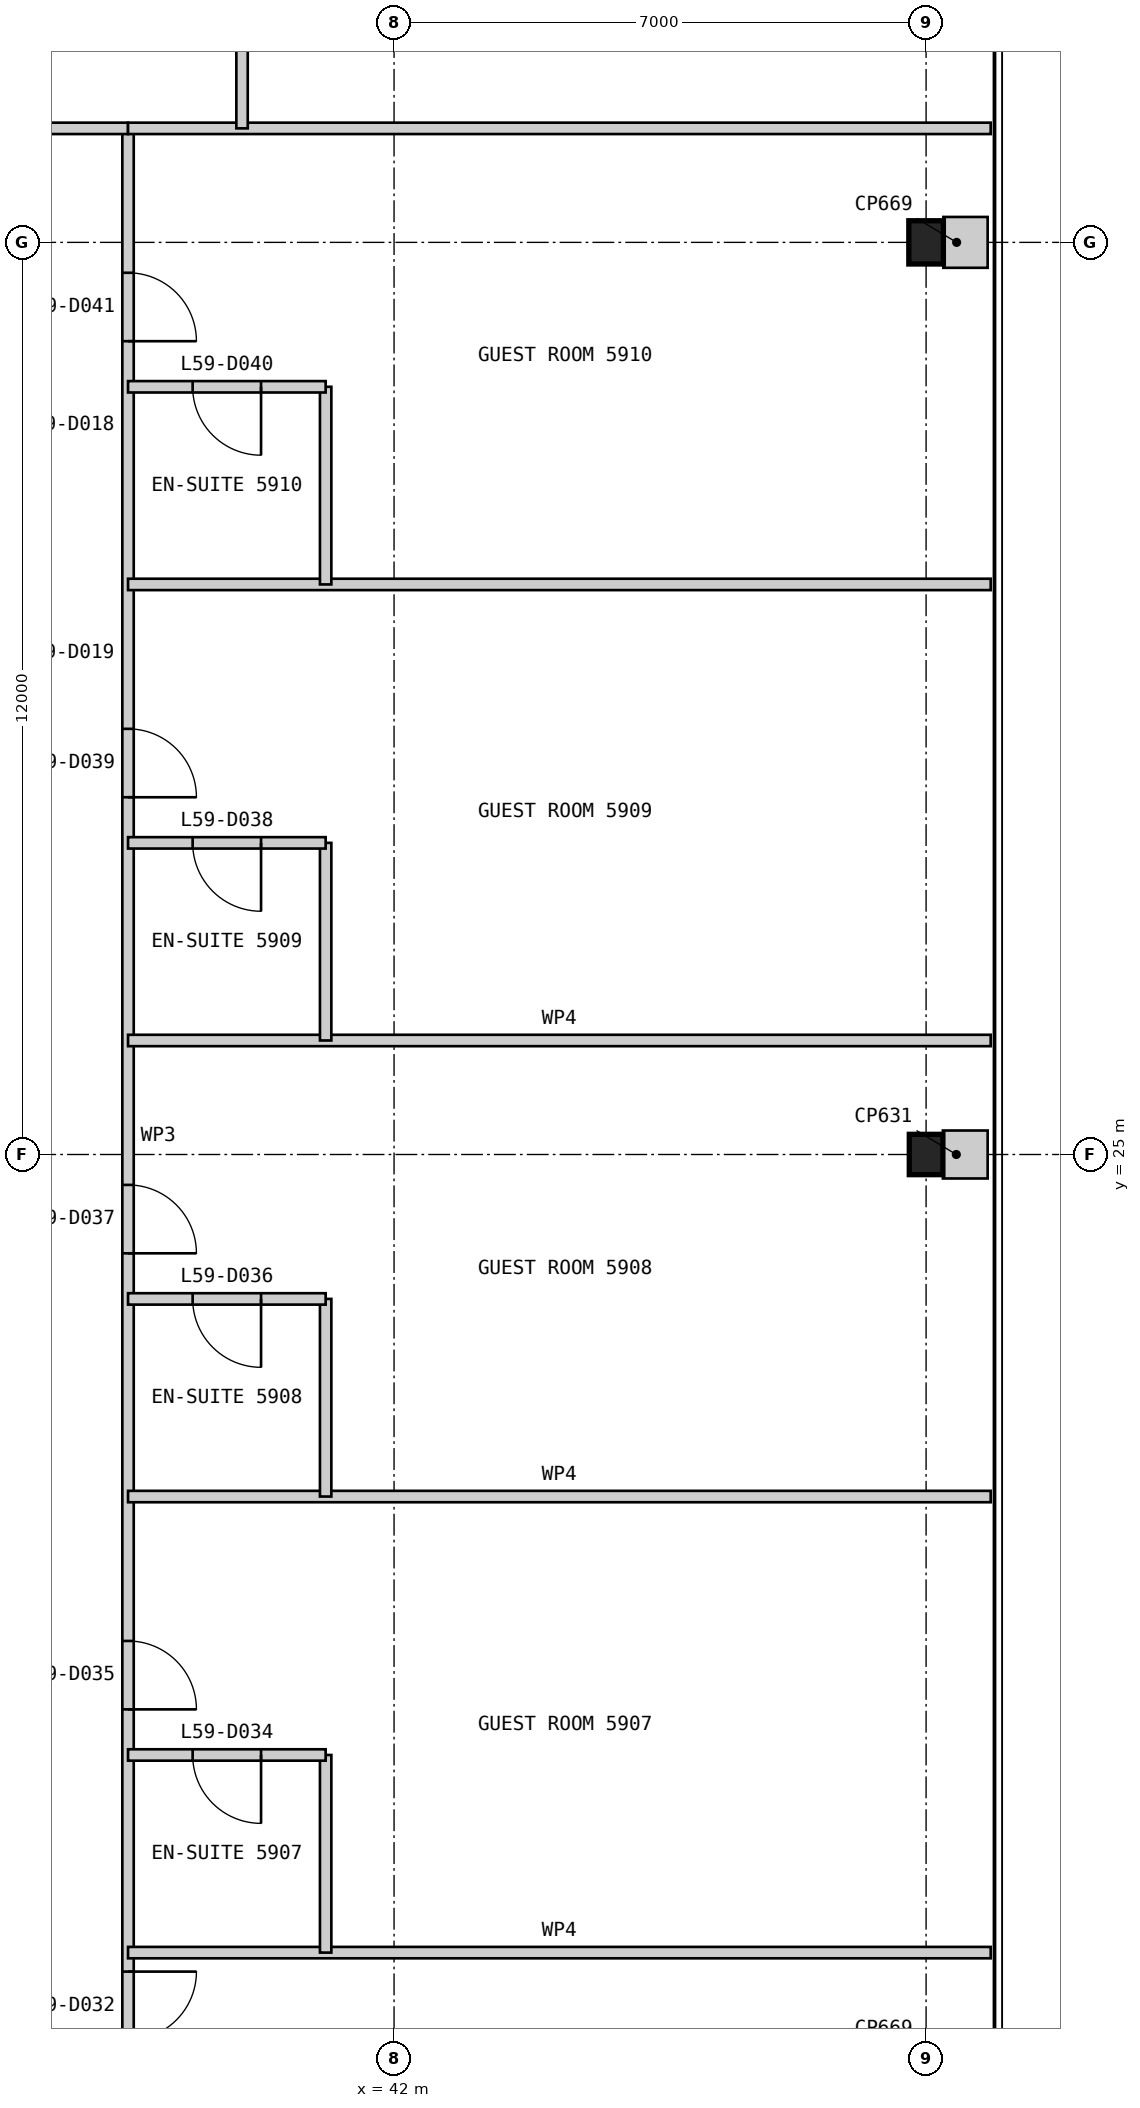
"""IFC4 building model, lengths in metres.
Left out: names, types, materials, properties, quantities, classifications, styles, units other than length and angle.
Written with IfcOpenShell. Run it as: python <this file> out.ifc"""

import sys

from ifc_helpers import new_model, si_unit, direction, frame, frame_2d, origin, origin_2d, place, context, subcontext, project, spatial, rectangle, i_section, extrude, element, fill, save


model = new_model("IFC4")
c1 = context("Model", 3, precision=1e-05, world=origin(), true_north=direction((0.0, 1.0)))
c2 = subcontext(c1, "Body", "Model", "MODEL_VIEW")
j1 = project(units=[si_unit("LENGTHUNIT", "METRE"), si_unit("PLANEANGLEUNIT", "RADIAN")], contexts=[c1])
p1 = place(None, origin())
s1 = spatial("IfcSite", under=j1, at=p1, CompositionType="ELEMENT")
p2 = place(p1, origin())
s2 = spatial("IfcBuilding", under=s1, at=p2, CompositionType="ELEMENT")
p3 = place(p2, frame((0.0, 0.0, 252.6)))
s3 = spatial("IfcBuildingStorey", under=s2, at=p3, CompositionType="ELEMENT", Elevation=252.6)
p4 = place(p3, frame((49.0, 25.0, 0.0), z_axis=(0.0, 0.0, 1.0), x_axis=(1.0, 0.0, 0.0)))
e1 = element("IfcColumn", 1, at=p4, inside=s3, PredefinedType="COLUMN", context=c2, shape_type="SweptSolid", body=[
    extrude(i_section(OverallWidth=0.442, OverallDepth=0.531, WebThickness=0.066, FlangeThickness=0.106, at=origin_2d()), origin(), (0.0, 0.0, 1.0), 3.4),
])
p5 = place(p3, frame((49.0, 37.0, 0.0), z_axis=(0.0, 0.0, 1.0), x_axis=(1.0, 0.0, 0.0)))
e2 = element("IfcColumn", 2, at=p5, inside=s3, PredefinedType="COLUMN", context=c2, shape_type="SweptSolid", body=[
    extrude(i_section(OverallWidth=0.455, OverallDepth=0.569, WebThickness=0.078, FlangeThickness=0.125, at=origin_2d()), origin(), (0.0, 0.0, 1.0), 3.4),
])
p6 = place(p3, frame((38.5, 11.5, 0.0), z_axis=(0.0, 0.0, 1.0), x_axis=(0.0, 1.0, 0.0)))
e3 = element("IfcWall", 3, at=p6, inside=s3, PredefinedType="PARTITIONING", context=c2, shape_type="SweptSolid", body=[
    extrude(rectangle(XDim=27.0, YDim=0.15, at=frame_2d((13.5, 0.0))), origin(), (0.0, 0.0, 1.0), 3.25),
])
p7 = place(p6, frame((1.85, 0.0, 0.0)))
e4 = element("IfcOpeningElement", 4, at=p7, cuts=e3, PredefinedType="OPENING", context=c2, shape_type="SweptSolid", body=[
    extrude(rectangle(XDim=0.9, YDim=2.1, at=frame_2d((0.45, 1.05))), frame((0.0, 0.085, 0.0), z_axis=(0.0, -1.0, 0.0), x_axis=(1.0, 0.0, 0.0)), (0.0, 0.0, 1.0), 0.17),
])
p8 = place(p6, frame((6.2, 0.0, 0.0)))
e5 = element("IfcOpeningElement", 5, at=p8, cuts=e3, PredefinedType="OPENING", context=c2, shape_type="SweptSolid", body=[
    extrude(rectangle(XDim=0.9, YDim=2.1, at=frame_2d((0.45, 1.05))), frame((0.0, 0.085, 0.0), z_axis=(0.0, -1.0, 0.0), x_axis=(1.0, 0.0, 0.0)), (0.0, 0.0, 1.0), 0.17),
])
p9 = place(p6, frame((12.2, 0.0, 0.0)))
e6 = element("IfcOpeningElement", 6, at=p9, cuts=e3, PredefinedType="OPENING", context=c2, shape_type="SweptSolid", body=[
    extrude(rectangle(XDim=0.9, YDim=2.1, at=frame_2d((0.45, 1.05))), frame((0.0, 0.085, 0.0), z_axis=(0.0, -1.0, 0.0), x_axis=(1.0, 0.0, 0.0)), (0.0, 0.0, 1.0), 0.17),
])
p10 = place(p6, frame((18.2, 0.0, 0.0)))
e7 = element("IfcOpeningElement", 7, at=p10, cuts=e3, PredefinedType="OPENING", context=c2, shape_type="SweptSolid", body=[
    extrude(rectangle(XDim=0.9, YDim=2.1, at=frame_2d((0.45, 1.05))), frame((0.0, 0.085, 0.0), z_axis=(0.0, -1.0, 0.0), x_axis=(1.0, 0.0, 0.0)), (0.0, 0.0, 1.0), 0.17),
])
p11 = place(p6, frame((24.2, 0.0, 0.0)))
e8 = element("IfcOpeningElement", 8, at=p11, cuts=e3, PredefinedType="OPENING", context=c2, shape_type="SweptSolid", body=[
    extrude(rectangle(XDim=0.9, YDim=2.1, at=frame_2d((0.45, 1.05))), frame((0.0, 0.085, 0.0), z_axis=(0.0, -1.0, 0.0), x_axis=(1.0, 0.0, 0.0)), (0.0, 0.0, 1.0), 0.17),
])
p12 = place(p3, frame((49.85, 14.5, 0.0), z_axis=(0.0, 0.0, 1.0), x_axis=(-1.0, 0.0, 0.0)))
e9 = element("IfcWall", 9, at=p12, inside=s3, PredefinedType="PARTITIONING", context=c2, shape_type="SweptSolid", body=[
    extrude(rectangle(XDim=11.35, YDim=0.15, at=frame_2d((5.675, 0.0))), origin(), (0.0, 0.0, 1.0), 3.25),
])
p13 = place(p3, frame((41.1, 14.5, 0.0), z_axis=(0.0, 0.0, 1.0), x_axis=(0.0, 1.0, 0.0)))
e10 = element("IfcWall", 10, at=p13, inside=s3, PredefinedType="PARTITIONING", context=c2, shape_type="SweptSolid", body=[
    extrude(rectangle(XDim=2.6, YDim=0.15, at=frame_2d((1.3, 0.0))), origin(), (0.0, 0.0, 1.0), 3.25),
])
p14 = place(p3, frame((41.1, 17.1, 0.0), z_axis=(0.0, 0.0, 1.0), x_axis=(-1.0, 0.0, 0.0)))
e11 = element("IfcWall", 11, at=p14, inside=s3, PredefinedType="PARTITIONING", context=c2, shape_type="SweptSolid", body=[
    extrude(rectangle(XDim=2.6, YDim=0.15, at=frame_2d((1.3, 0.0))), origin(), (0.0, 0.0, 1.0), 3.25),
])
p15 = place(p14, frame((0.85, 0.0, 0.0)))
e12 = element("IfcOpeningElement", 12, at=p15, cuts=e11, PredefinedType="OPENING", context=c2, shape_type="SweptSolid", body=[
    extrude(rectangle(XDim=0.9, YDim=2.1, at=frame_2d((0.45, 1.05))), frame((0.0, 0.085, 0.0), z_axis=(0.0, -1.0, 0.0), x_axis=(1.0, 0.0, 0.0)), (0.0, 0.0, 1.0), 0.17),
])
p16 = place(p3, frame((49.85, 20.5, 0.0), z_axis=(0.0, 0.0, 1.0), x_axis=(-1.0, 0.0, 0.0)))
e13 = element("IfcWall", 13, at=p16, inside=s3, PredefinedType="PARTITIONING", context=c2, shape_type="SweptSolid", body=[
    extrude(rectangle(XDim=11.35, YDim=0.15, at=frame_2d((5.675, 0.0))), origin(), (0.0, 0.0, 1.0), 3.25),
])
p17 = place(p3, frame((41.1, 20.5, 0.0), z_axis=(0.0, 0.0, 1.0), x_axis=(0.0, 1.0, 0.0)))
e14 = element("IfcWall", 14, at=p17, inside=s3, PredefinedType="PARTITIONING", context=c2, shape_type="SweptSolid", body=[
    extrude(rectangle(XDim=2.6, YDim=0.15, at=frame_2d((1.3, 0.0))), origin(), (0.0, 0.0, 1.0), 3.25),
])
p18 = place(p3, frame((41.1, 23.1, 0.0), z_axis=(0.0, 0.0, 1.0), x_axis=(-1.0, 0.0, 0.0)))
e15 = element("IfcWall", 15, at=p18, inside=s3, PredefinedType="PARTITIONING", context=c2, shape_type="SweptSolid", body=[
    extrude(rectangle(XDim=2.6, YDim=0.15, at=frame_2d((1.3, 0.0))), origin(), (0.0, 0.0, 1.0), 3.25),
])
p19 = place(p18, frame((0.85, 0.0, 0.0)))
e16 = element("IfcOpeningElement", 16, at=p19, cuts=e15, PredefinedType="OPENING", context=c2, shape_type="SweptSolid", body=[
    extrude(rectangle(XDim=0.9, YDim=2.1, at=frame_2d((0.45, 1.05))), frame((0.0, 0.085, 0.0), z_axis=(0.0, -1.0, 0.0), x_axis=(1.0, 0.0, 0.0)), (0.0, 0.0, 1.0), 0.17),
])
p20 = place(p3, frame((49.85, 26.5, 0.0), z_axis=(0.0, 0.0, 1.0), x_axis=(-1.0, 0.0, 0.0)))
e17 = element("IfcWall", 17, at=p20, inside=s3, PredefinedType="PARTITIONING", context=c2, shape_type="SweptSolid", body=[
    extrude(rectangle(XDim=11.35, YDim=0.15, at=frame_2d((5.675, 0.0))), origin(), (0.0, 0.0, 1.0), 3.25),
])
p21 = place(p3, frame((41.1, 26.5, 0.0), z_axis=(0.0, 0.0, 1.0), x_axis=(0.0, 1.0, 0.0)))
e18 = element("IfcWall", 18, at=p21, inside=s3, PredefinedType="PARTITIONING", context=c2, shape_type="SweptSolid", body=[
    extrude(rectangle(XDim=2.6, YDim=0.15, at=frame_2d((1.3, 0.0))), origin(), (0.0, 0.0, 1.0), 3.25),
])
p22 = place(p3, frame((41.1, 29.1, 0.0), z_axis=(0.0, 0.0, 1.0), x_axis=(-1.0, 0.0, 0.0)))
e19 = element("IfcWall", 19, at=p22, inside=s3, PredefinedType="PARTITIONING", context=c2, shape_type="SweptSolid", body=[
    extrude(rectangle(XDim=2.6, YDim=0.15, at=frame_2d((1.3, 0.0))), origin(), (0.0, 0.0, 1.0), 3.25),
])
p23 = place(p22, frame((0.85, 0.0, 0.0)))
e20 = element("IfcOpeningElement", 20, at=p23, cuts=e19, PredefinedType="OPENING", context=c2, shape_type="SweptSolid", body=[
    extrude(rectangle(XDim=0.9, YDim=2.1, at=frame_2d((0.45, 1.05))), frame((0.0, 0.085, 0.0), z_axis=(0.0, -1.0, 0.0), x_axis=(1.0, 0.0, 0.0)), (0.0, 0.0, 1.0), 0.17),
])
p24 = place(p3, frame((49.85, 32.5, 0.0), z_axis=(0.0, 0.0, 1.0), x_axis=(-1.0, 0.0, 0.0)))
e21 = element("IfcWall", 21, at=p24, inside=s3, PredefinedType="PARTITIONING", context=c2, shape_type="SweptSolid", body=[
    extrude(rectangle(XDim=11.35, YDim=0.15, at=frame_2d((5.675, 0.0))), origin(), (0.0, 0.0, 1.0), 3.25),
])
p25 = place(p3, frame((41.1, 32.5, 0.0), z_axis=(0.0, 0.0, 1.0), x_axis=(0.0, 1.0, 0.0)))
e22 = element("IfcWall", 22, at=p25, inside=s3, PredefinedType="PARTITIONING", context=c2, shape_type="SweptSolid", body=[
    extrude(rectangle(XDim=2.6, YDim=0.15, at=frame_2d((1.3, 0.0))), origin(), (0.0, 0.0, 1.0), 3.25),
])
p26 = place(p3, frame((41.1, 35.1, 0.0), z_axis=(0.0, 0.0, 1.0), x_axis=(-1.0, 0.0, 0.0)))
e23 = element("IfcWall", 23, at=p26, inside=s3, PredefinedType="PARTITIONING", context=c2, shape_type="SweptSolid", body=[
    extrude(rectangle(XDim=2.6, YDim=0.15, at=frame_2d((1.3, 0.0))), origin(), (0.0, 0.0, 1.0), 3.25),
])
p27 = place(p26, frame((0.85, 0.0, 0.0)))
e24 = element("IfcOpeningElement", 24, at=p27, cuts=e23, PredefinedType="OPENING", context=c2, shape_type="SweptSolid", body=[
    extrude(rectangle(XDim=0.9, YDim=2.1, at=frame_2d((0.45, 1.05))), frame((0.0, 0.085, 0.0), z_axis=(0.0, -1.0, 0.0), x_axis=(1.0, 0.0, 0.0)), (0.0, 0.0, 1.0), 0.17),
])
p28 = place(p3, frame((38.5, 38.5, 0.0), z_axis=(0.0, 0.0, 1.0), x_axis=(-1.0, 0.0, 0.0)))
e25 = element("IfcWall", 25, at=p28, inside=s3, PredefinedType="PARTITIONING", context=c2, shape_type="SweptSolid", body=[
    extrude(rectangle(XDim=27.0, YDim=0.15, at=frame_2d((13.5, 0.0))), origin(), (0.0, 0.0, 1.0), 3.25),
])
p29 = place(p28, frame((1.85, 0.0, 0.0)))
e26 = element("IfcOpeningElement", 26, at=p29, cuts=e25, PredefinedType="OPENING", context=c2, shape_type="SweptSolid", body=[
    extrude(rectangle(XDim=0.9, YDim=2.1, at=frame_2d((0.45, 1.05))), frame((0.0, 0.085, 0.0), z_axis=(0.0, -1.0, 0.0), x_axis=(1.0, 0.0, 0.0)), (0.0, 0.0, 1.0), 0.17),
])
p30 = place(p28, frame((6.2, 0.0, 0.0)))
e27 = element("IfcOpeningElement", 27, at=p30, cuts=e25, PredefinedType="OPENING", context=c2, shape_type="SweptSolid", body=[
    extrude(rectangle(XDim=0.9, YDim=2.1, at=frame_2d((0.45, 1.05))), frame((0.0, 0.085, 0.0), z_axis=(0.0, -1.0, 0.0), x_axis=(1.0, 0.0, 0.0)), (0.0, 0.0, 1.0), 0.17),
])
p31 = place(p28, frame((12.8, 0.0, 0.0)))
e28 = element("IfcOpeningElement", 28, at=p31, cuts=e25, PredefinedType="OPENING", context=c2, shape_type="SweptSolid", body=[
    extrude(rectangle(XDim=1.0, YDim=2.1, at=frame_2d((0.5, 1.05))), frame((0.0, 0.085, 0.0), z_axis=(0.0, -1.0, 0.0), x_axis=(1.0, 0.0, 0.0)), (0.0, 0.0, 1.0), 0.17),
])
p32 = place(p28, frame((18.2, 0.0, 0.0)))
e29 = element("IfcOpeningElement", 29, at=p32, cuts=e25, PredefinedType="OPENING", context=c2, shape_type="SweptSolid", body=[
    extrude(rectangle(XDim=0.9, YDim=2.1, at=frame_2d((0.45, 1.05))), frame((0.0, 0.085, 0.0), z_axis=(0.0, -1.0, 0.0), x_axis=(1.0, 0.0, 0.0)), (0.0, 0.0, 1.0), 0.17),
])
p33 = place(p28, frame((24.2, 0.0, 0.0)))
e30 = element("IfcOpeningElement", 30, at=p33, cuts=e25, PredefinedType="OPENING", context=c2, shape_type="SweptSolid", body=[
    extrude(rectangle(XDim=0.9, YDim=2.1, at=frame_2d((0.45, 1.05))), frame((0.0, 0.085, 0.0), z_axis=(0.0, -1.0, 0.0), x_axis=(1.0, 0.0, 0.0)), (0.0, 0.0, 1.0), 0.17),
])
p34 = place(p3, frame((49.85, 38.5, 0.0), z_axis=(0.0, 0.0, 1.0), x_axis=(-1.0, 0.0, 0.0)))
e31 = element("IfcWall", 31, at=p34, inside=s3, PredefinedType="PARTITIONING", context=c2, shape_type="SweptSolid", body=[
    extrude(rectangle(XDim=11.35, YDim=0.15, at=frame_2d((5.675, 0.0))), origin(), (0.0, 0.0, 1.0), 3.25),
])
p35 = place(p3, frame((40.0, 41.1, 0.0), z_axis=(0.0, 0.0, 1.0), x_axis=(0.0, -1.0, 0.0)))
e32 = element("IfcWall", 32, at=p35, inside=s3, PredefinedType="PARTITIONING", context=c2, shape_type="SweptSolid", body=[
    extrude(rectangle(XDim=2.6, YDim=0.15, at=frame_2d((1.3, 0.0))), origin(), (0.0, 0.0, 1.0), 3.25),
])
p36 = place(p3, frame((49.81, 25.0, 0.0), z_axis=(0.0, 0.0, 1.0), x_axis=(-1.0, 0.0, 0.0)))
e33 = element("IfcWall", 33, at=p36, inside=s3, PredefinedType="PARTITIONING", context=c2, shape_type="SweptSolid", body=[
    extrude(rectangle(XDim=0.589, YDim=0.631, at=frame_2d((0.294, 0.0))), origin(), (0.0, 0.0, 1.0), 3.25),
])
p37 = place(p3, frame((49.81, 37.0, 0.0), z_axis=(0.0, 0.0, 1.0), x_axis=(-1.0, 0.0, 0.0)))
e34 = element("IfcWall", 34, at=p37, inside=s3, PredefinedType="PARTITIONING", context=c2, shape_type="SweptSolid", body=[
    extrude(rectangle(XDim=0.583, YDim=0.669, at=frame_2d((0.292, 0.0))), origin(), (0.0, 0.0, 1.0), 3.25),
])
p38 = place(p7, frame((0.9, 0.0, 0.0), z_axis=(0.0, 0.0, 1.0), x_axis=(-1.0, 0.0, 0.0)))
e35 = element("IfcDoor", 35, at=p38, inside=s3, OperationType="SINGLE_SWING_LEFT", PredefinedType="DOOR", context=c2, shape_type="SweptSolid", body=[
    extrude(rectangle(XDim=0.9, YDim=2.1, at=frame_2d((0.45, 1.05))), frame((0.0, 0.025, 0.0), z_axis=(0.0, -1.0, 0.0), x_axis=(1.0, 0.0, 0.0)), (0.0, 0.0, 1.0), 0.05),
])
fill(e4, e35)
p39 = place(p15, origin())
e36 = element("IfcDoor", 36, at=p39, inside=s3, OperationType="SINGLE_SWING_LEFT", PredefinedType="DOOR", context=c2, shape_type="SweptSolid", body=[
    extrude(rectangle(XDim=0.9, YDim=2.1, at=frame_2d((0.45, 1.05))), frame((0.0, 0.025, 0.0), z_axis=(0.0, -1.0, 0.0), x_axis=(1.0, 0.0, 0.0)), (0.0, 0.0, 1.0), 0.05),
])
fill(e12, e36)
p40 = place(p8, frame((0.9, 0.0, 0.0), z_axis=(0.0, 0.0, 1.0), x_axis=(-1.0, 0.0, 0.0)))
e37 = element("IfcDoor", 37, at=p40, inside=s3, OperationType="SINGLE_SWING_RIGHT", PredefinedType="DOOR", context=c2, shape_type="SweptSolid", body=[
    extrude(rectangle(XDim=0.9, YDim=2.1, at=frame_2d((0.45, 1.05))), frame((0.0, 0.025, 0.0), z_axis=(0.0, -1.0, 0.0), x_axis=(1.0, 0.0, 0.0)), (0.0, 0.0, 1.0), 0.05),
])
fill(e5, e37)
p41 = place(p19, origin())
e38 = element("IfcDoor", 38, at=p41, inside=s3, OperationType="SINGLE_SWING_LEFT", PredefinedType="DOOR", context=c2, shape_type="SweptSolid", body=[
    extrude(rectangle(XDim=0.9, YDim=2.1, at=frame_2d((0.45, 1.05))), frame((0.0, 0.025, 0.0), z_axis=(0.0, -1.0, 0.0), x_axis=(1.0, 0.0, 0.0)), (0.0, 0.0, 1.0), 0.05),
])
fill(e16, e38)
p42 = place(p9, frame((0.9, 0.0, 0.0), z_axis=(0.0, 0.0, 1.0), x_axis=(-1.0, 0.0, 0.0)))
e39 = element("IfcDoor", 39, at=p42, inside=s3, OperationType="SINGLE_SWING_RIGHT", PredefinedType="DOOR", context=c2, shape_type="SweptSolid", body=[
    extrude(rectangle(XDim=0.9, YDim=2.1, at=frame_2d((0.45, 1.05))), frame((0.0, 0.025, 0.0), z_axis=(0.0, -1.0, 0.0), x_axis=(1.0, 0.0, 0.0)), (0.0, 0.0, 1.0), 0.05),
])
fill(e6, e39)
p43 = place(p23, origin())
e40 = element("IfcDoor", 40, at=p43, inside=s3, OperationType="SINGLE_SWING_LEFT", PredefinedType="DOOR", context=c2, shape_type="SweptSolid", body=[
    extrude(rectangle(XDim=0.9, YDim=2.1, at=frame_2d((0.45, 1.05))), frame((0.0, 0.025, 0.0), z_axis=(0.0, -1.0, 0.0), x_axis=(1.0, 0.0, 0.0)), (0.0, 0.0, 1.0), 0.05),
])
fill(e20, e40)
p44 = place(p10, frame((0.9, 0.0, 0.0), z_axis=(0.0, 0.0, 1.0), x_axis=(-1.0, 0.0, 0.0)))
e41 = element("IfcDoor", 41, at=p44, inside=s3, OperationType="SINGLE_SWING_RIGHT", PredefinedType="DOOR", context=c2, shape_type="SweptSolid", body=[
    extrude(rectangle(XDim=0.9, YDim=2.1, at=frame_2d((0.45, 1.05))), frame((0.0, 0.025, 0.0), z_axis=(0.0, -1.0, 0.0), x_axis=(1.0, 0.0, 0.0)), (0.0, 0.0, 1.0), 0.05),
])
fill(e7, e41)
p45 = place(p27, origin())
e42 = element("IfcDoor", 42, at=p45, inside=s3, OperationType="SINGLE_SWING_LEFT", PredefinedType="DOOR", context=c2, shape_type="SweptSolid", body=[
    extrude(rectangle(XDim=0.9, YDim=2.1, at=frame_2d((0.45, 1.05))), frame((0.0, 0.025, 0.0), z_axis=(0.0, -1.0, 0.0), x_axis=(1.0, 0.0, 0.0)), (0.0, 0.0, 1.0), 0.05),
])
fill(e24, e42)
p46 = place(p11, frame((0.9, 0.0, 0.0), z_axis=(0.0, 0.0, 1.0), x_axis=(-1.0, 0.0, 0.0)))
e43 = element("IfcDoor", 43, at=p46, inside=s3, OperationType="SINGLE_SWING_RIGHT", PredefinedType="DOOR", context=c2, shape_type="SweptSolid", body=[
    extrude(rectangle(XDim=0.9, YDim=2.1, at=frame_2d((0.45, 1.05))), frame((0.0, 0.025, 0.0), z_axis=(0.0, -1.0, 0.0), x_axis=(1.0, 0.0, 0.0)), (0.0, 0.0, 1.0), 0.05),
])
fill(e8, e43)
save(model, sys.argv[1])
